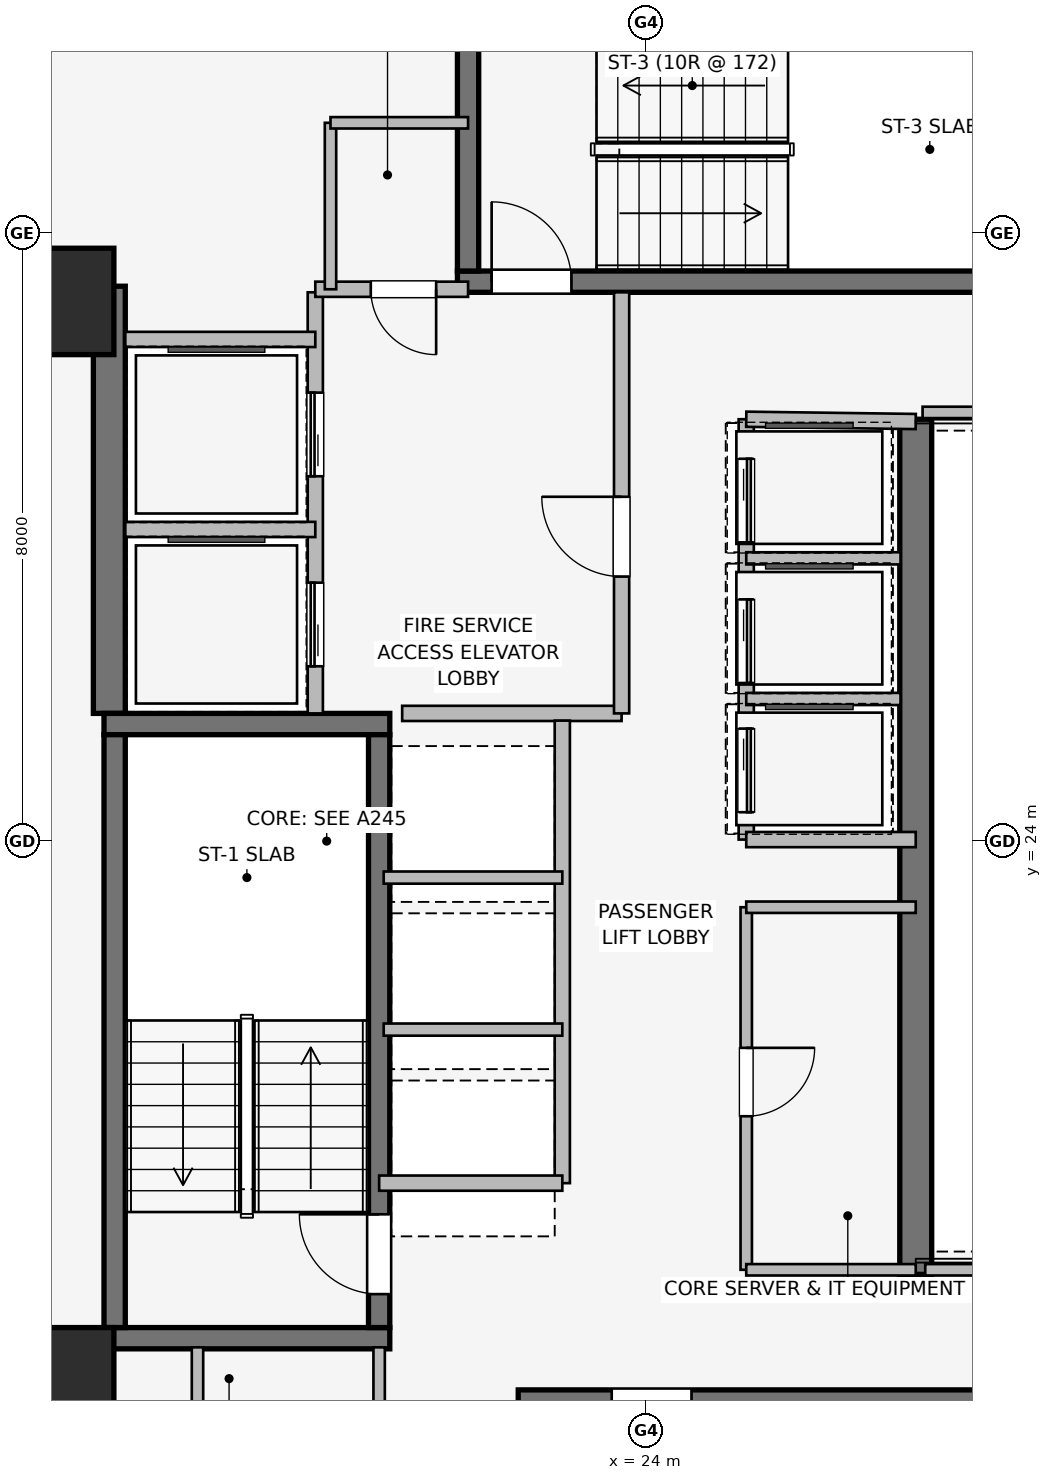
"""IFC4 building model, lengths in metres.
Left out: names, types, materials, properties, quantities, classifications, styles, units other than length and angle.
Written with IfcOpenShell. Run it as: python <this file> out.ifc"""

import sys

from ifc_helpers import new_model, si_unit, direction, frame, frame_2d, origin, origin_2d, place, context, subcontext, project, spatial, rectangle, extrude, element, fill, save


model = new_model("IFC4")
c1 = context("Model", 3, precision=1e-05, world=origin(), true_north=direction((0.0, 1.0)))
c2 = subcontext(c1, "Body", "Model", "MODEL_VIEW")
j1 = project(units=[si_unit("LENGTHUNIT", "METRE"), si_unit("PLANEANGLEUNIT", "RADIAN")], contexts=[c1])
p1 = place(None, origin())
s1 = spatial("IfcSite", under=j1, at=p1, CompositionType="ELEMENT")
p2 = place(p1, origin())
s2 = spatial("IfcBuilding", under=s1, at=p2, CompositionType="ELEMENT")
p3 = place(p2, frame((0.0, 0.0, 160.2)))
s3 = spatial("IfcBuildingStorey", under=s2, at=p3, CompositionType="ELEMENT", Elevation=160.2)
p4 = place(p3, frame((16.94, 25.68, 0.0), z_axis=(0.0, 0.0, 1.0), x_axis=(0.0, 1.0, 0.0)))
e1 = element("IfcWall", 1, at=p4, inside=s3, PredefinedType="SHEAR", context=c2, shape_type="SweptSolid", body=[
    extrude(rectangle(XDim=5.62, YDim=0.42, at=frame_2d((2.81, 0.0))), origin(), (0.0, 0.0, 1.0), 3.45),
])
p5 = place(p3, frame((27.55, 29.55, 0.0), z_axis=(0.0, 0.0, 1.0), x_axis=(0.0, -1.0, 0.0)))
e2 = element("IfcWall", 2, at=p5, inside=s3, PredefinedType="SHEAR", context=c2, shape_type="SweptSolid", body=[
    extrude(rectangle(XDim=11.25, YDim=0.42, at=frame_2d((5.625, 0.0))), origin(), (0.0, 0.0, 1.0), 3.45),
])
for number, where, z_axis, x_axis in (
    (3, (16.87, 17.46, 0.0), (0.0, 0.0, 1.0), (1.0, 0.0, 0.0)),
    (4, (20.63, 25.54, 0.0), (0.0, 0.0, 1.0), (-1.0, 0.0, 0.0)),
):
    element("IfcWall", number, at=place(p3, frame(where, z_axis=z_axis, x_axis=x_axis)), inside=s3, PredefinedType="SHEAR", context=c2, shape_type="SweptSolid", body=[
        extrude(rectangle(XDim=3.76, YDim=0.28, at=frame_2d((1.88, 0.0))), origin(), (0.0, 0.0, 1.0), 3.45),
    ])
p6 = place(p3, frame((17.01, 25.4, 0.0), z_axis=(0.0, 0.0, 1.0), x_axis=(0.0, -1.0, 0.0)))
e5 = element("IfcWall", 5, at=p6, inside=s3, PredefinedType="SHEAR", context=c2, shape_type="SweptSolid", body=[
    extrude(rectangle(XDim=7.8, YDim=0.28, at=frame_2d((3.9, 0.0))), origin(), (0.0, 0.0, 1.0), 3.45),
])
p7 = place(p3, frame((20.49, 17.6, 0.0), z_axis=(0.0, 0.0, 1.0), x_axis=(0.0, 1.0, 0.0)))
e6 = element("IfcWall", 6, at=p7, inside=s3, PredefinedType="SHEAR", context=c2, shape_type="SweptSolid", body=[
    extrude(rectangle(XDim=7.8, YDim=0.28, at=frame_2d((3.9, 0.0))), origin(), (0.0, 0.0, 1.0), 3.45),
])
p8 = place(p7, frame((0.44, 0.0, 0.0)))
e7 = element("IfcOpeningElement", 7, at=p8, cuts=e6, PredefinedType="OPENING", context=c2, shape_type="SweptSolid", body=[
    extrude(rectangle(XDim=1.05, YDim=2.0, at=frame_2d((0.525, 1.0))), frame((0.0, 0.15, 0.0), z_axis=(0.0, -1.0, 0.0), x_axis=(1.0, 0.0, 0.0)), (0.0, 0.0, 1.0), 0.3),
])
p9 = place(p3, frame((30.68, 16.64, 0.0), z_axis=(0.0, 0.0, 1.0), x_axis=(-1.0, 0.0, 0.0)))
e8 = element("IfcWall", 8, at=p9, inside=s3, PredefinedType="SHEAR", context=c2, shape_type="SweptSolid", body=[
    extrude(rectangle(XDim=8.36, YDim=0.28, at=frame_2d((4.18, 0.0))), origin(), (0.0, 0.0, 1.0), 3.45),
])
p10 = place(p9, frame((6.08, 0.0, 0.0)))
e9 = element("IfcOpeningElement", 9, at=p10, cuts=e8, PredefinedType="OPENING", context=c2, shape_type="SweptSolid", body=[
    extrude(rectangle(XDim=1.05, YDim=2.0, at=frame_2d((0.525, 1.0))), frame((0.0, 0.15, 0.0), z_axis=(0.0, -1.0, 0.0), x_axis=(1.0, 0.0, 0.0)), (0.0, 0.0, 1.0), 0.3),
])
p11 = place(p3, frame((21.52, 31.36, 0.0), z_axis=(0.0, 0.0, 1.0), x_axis=(1.0, 0.0, 0.0)))
e10 = element("IfcWall", 10, at=p11, inside=s3, PredefinedType="SHEAR", context=c2, shape_type="SweptSolid", body=[
    extrude(rectangle(XDim=8.36, YDim=0.28, at=frame_2d((4.18, 0.0))), origin(), (0.0, 0.0, 1.0), 3.45),
])
p12 = place(p11, frame((0.45, 0.0, 0.0)))
e11 = element("IfcOpeningElement", 11, at=p12, cuts=e10, PredefinedType="OPENING", context=c2, shape_type="SweptSolid", body=[
    extrude(rectangle(XDim=1.05, YDim=2.0, at=frame_2d((0.525, 1.0))), frame((0.0, 0.15, 0.0), z_axis=(0.0, -1.0, 0.0), x_axis=(1.0, 0.0, 0.0)), (0.0, 0.0, 1.0), 0.3),
])
p13 = place(p3, frame((21.66, 34.7, 0.0), z_axis=(0.0, 0.0, 1.0), x_axis=(0.0, -1.0, 0.0)))
e12 = element("IfcWall", 12, at=p13, inside=s3, PredefinedType="SHEAR", context=c2, shape_type="SweptSolid", body=[
    extrude(rectangle(XDim=3.2, YDim=0.28, at=frame_2d((1.6, 0.0))), origin(), (0.0, 0.0, 1.0), 3.45),
])
for number, where, z_axis, x_axis in (
    (13, (16.3, 16.9, 0.0), (0.0, 0.0, 1.0), (1.0, 0.0, 0.0)),
    (14, (16.3, 31.1, 0.0), (0.0, 0.0, 1.0), (1.0, 0.0, 0.0)),
):
    element("IfcColumn", number, at=place(p3, frame(where, z_axis=z_axis, x_axis=x_axis)), inside=s3, PredefinedType="COLUMN", context=c2, shape_type="SweptSolid", body=[
        extrude(rectangle(XDim=1.4, YDim=1.4, at=origin_2d()), origin(), (0.0, 0.0, 1.0), 3.45),
    ])
p14 = place(p3, frame((19.65, 25.68, 0.0), z_axis=(0.0, 0.0, 1.0), x_axis=(0.0, 1.0, 0.0)))
e15 = element("IfcWall", 15, at=p14, inside=s3, PredefinedType="PARTITIONING", context=c2, shape_type="SweptSolid", body=[
    extrude(rectangle(XDim=5.54, YDim=0.2, at=frame_2d((2.77, 0.0))), origin(), (0.0, 0.0, 1.0), 3.03),
])
p15 = place(p14, frame((0.62, 0.0, 0.0)))
e16 = element("IfcOpeningElement", 16, at=p15, cuts=e15, PredefinedType="OPENING", context=c2, shape_type="SweptSolid", body=[
    extrude(rectangle(XDim=1.1, YDim=2.2, at=frame_2d((0.55, 1.1))), frame((0.0, 0.11, 0.0), z_axis=(0.0, -1.0, 0.0), x_axis=(1.0, 0.0, 0.0)), (0.0, 0.0, 1.0), 0.22),
])
p16 = place(p14, frame((3.12, 0.0, 0.0)))
e17 = element("IfcOpeningElement", 17, at=p16, cuts=e15, PredefinedType="OPENING", context=c2, shape_type="SweptSolid", body=[
    extrude(rectangle(XDim=1.1, YDim=2.2, at=frame_2d((0.55, 1.1))), frame((0.0, 0.11, 0.0), z_axis=(0.0, -1.0, 0.0), x_axis=(1.0, 0.0, 0.0)), (0.0, 0.0, 1.0), 0.22),
])
p17 = place(p3, frame((20.793, 25.68, 0.0), z_axis=(0.0, 0.0, 1.0), x_axis=(1.0, 0.0, 0.0)))
e18 = element("IfcWall", 18, at=p17, inside=s3, PredefinedType="PARTITIONING", context=c2, shape_type="SweptSolid", body=[
    extrude(rectangle(XDim=2.887, YDim=0.2, at=frame_2d((1.443, 0.0))), origin(), (0.0, 0.0, 1.0), 3.03),
])
p18 = place(p3, frame((23.68, 25.68, 0.0), z_axis=(0.0, 0.0, 1.0), x_axis=(0.0, 1.0, 0.0)))
e19 = element("IfcWall", 19, at=p18, inside=s3, PredefinedType="PARTITIONING", context=c2, shape_type="SweptSolid", body=[
    extrude(rectangle(XDim=5.54, YDim=0.2, at=frame_2d((2.77, 0.0))), origin(), (0.0, 0.0, 1.0), 3.03),
])
p19 = place(p18, frame((1.8, 0.0, 0.0)))
e20 = element("IfcOpeningElement", 20, at=p19, cuts=e19, PredefinedType="OPENING", context=c2, shape_type="SweptSolid", body=[
    extrude(rectangle(XDim=1.05, YDim=2.0, at=frame_2d((0.525, 1.0))), frame((0.0, 0.11, 0.0), z_axis=(0.0, -1.0, 0.0), x_axis=(1.0, 0.0, 0.0)), (0.0, 0.0, 1.0), 0.22),
])
p20 = place(p3, frame((21.66, 31.26, 0.0), z_axis=(0.0, 0.0, 1.0), x_axis=(-1.0, 0.0, 0.0)))
e21 = element("IfcWall", 21, at=p20, inside=s3, PredefinedType="PARTITIONING", context=c2, shape_type="SweptSolid", body=[
    extrude(rectangle(XDim=2.01, YDim=0.2, at=frame_2d((1.005, 0.0))), origin(), (0.0, 0.0, 1.0), 3.03),
])
p21 = place(p20, frame((0.42, 0.0, 0.0)))
e22 = element("IfcOpeningElement", 22, at=p21, cuts=e21, PredefinedType="OPENING", context=c2, shape_type="SweptSolid", body=[
    extrude(rectangle(XDim=0.86, YDim=2.0, at=frame_2d((0.43, 1.0))), frame((0.0, 0.11, 0.0), z_axis=(0.0, -1.0, 0.0), x_axis=(1.0, 0.0, 0.0)), (0.0, 0.0, 1.0), 0.22),
])
p22 = place(p3, frame((17.15, 28.1, 0.0), z_axis=(0.0, 0.0, 1.0), x_axis=(1.0, 0.0, 0.0)))
e23 = element("IfcWall", 23, at=p22, inside=s3, PredefinedType="PARTITIONING", context=c2, shape_type="SweptSolid", body=[
    extrude(rectangle(XDim=2.5, YDim=0.2, at=frame_2d((1.25, 0.0))), origin(), (0.0, 0.0, 1.0), 3.03),
])
p23 = place(p3, frame((19.65, 30.6, 0.0), z_axis=(0.0, 0.0, 1.0), x_axis=(-1.0, 0.0, 0.0)))
e24 = element("IfcWall", 24, at=p23, inside=s3, PredefinedType="PARTITIONING", context=c2, shape_type="SweptSolid", body=[
    extrude(rectangle(XDim=2.5, YDim=0.2, at=frame_2d((1.25, 0.0))), origin(), (0.0, 0.0, 1.0), 1.93),
])
p24 = place(p3, frame((22.9, 19.5, 0.0), z_axis=(0.0, 0.0, 1.0), x_axis=(0.0, 1.0, 0.0)))
e25 = element("IfcWall", 25, at=p24, inside=s3, PredefinedType="PARTITIONING", context=c2, shape_type="SweptSolid", body=[
    extrude(rectangle(XDim=6.085, YDim=0.2, at=frame_2d((3.042, 0.0))), origin(), (0.0, 0.0, 1.0), 3.03),
])
p25 = place(p3, frame((20.49, 19.5, 0.0), z_axis=(0.0, 0.0, 1.0), x_axis=(1.0, 0.0, 0.0)))
e26 = element("IfcWall", 26, at=p25, inside=s3, PredefinedType="PARTITIONING", context=c2, shape_type="SweptSolid", body=[
    extrude(rectangle(XDim=2.41, YDim=0.2, at=frame_2d((1.205, 0.0))), origin(), (0.0, 0.0, 1.0), 1.93),
])
for number, where, z_axis, x_axis in (
    (27, (20.55, 21.52, 0.0), (0.0, 0.0, 1.0), (1.0, 0.0, 0.0)),
    (28, (20.55, 23.52, 0.0), (0.0, 0.0, 1.0), (1.0, 0.0, 0.0)),
):
    element("IfcWall", number, at=place(p3, frame(where, z_axis=z_axis, x_axis=x_axis)), inside=s3, PredefinedType="PARTITIONING", context=c2, shape_type="SweptSolid", body=[
        extrude(rectangle(XDim=2.35, YDim=0.16, at=frame_2d((1.175, 0.0))), origin(), (0.0, 0.0, 1.0), 3.03),
    ])
p26 = place(p3, frame((25.32, 29.55, 0.0), z_axis=(0.0, 0.0, 1.0), x_axis=(0.0, -1.0, 0.0)))
e29 = element("IfcWall", 29, at=p26, inside=s3, PredefinedType="PARTITIONING", context=c2, shape_type="SweptSolid", body=[
    extrude(rectangle(XDim=5.53, YDim=0.2, at=frame_2d((2.765, 0.0))), origin(), (0.0, 0.0, 1.0), 3.03),
])
p27 = place(p26, frame((0.52, 0.0, 0.0)))
e30 = element("IfcOpeningElement", 30, at=p27, cuts=e29, PredefinedType="OPENING", context=c2, shape_type="SweptSolid", body=[
    extrude(rectangle(XDim=1.1, YDim=2.2, at=frame_2d((0.55, 1.1))), frame((0.0, 0.11, 0.0), z_axis=(0.0, -1.0, 0.0), x_axis=(1.0, 0.0, 0.0)), (0.0, 0.0, 1.0), 0.22),
])
p28 = place(p26, frame((2.37, 0.0, 0.0)))
e31 = element("IfcOpeningElement", 31, at=p28, cuts=e29, PredefinedType="OPENING", context=c2, shape_type="SweptSolid", body=[
    extrude(rectangle(XDim=1.1, YDim=2.2, at=frame_2d((0.55, 1.1))), frame((0.0, 0.11, 0.0), z_axis=(0.0, -1.0, 0.0), x_axis=(1.0, 0.0, 0.0)), (0.0, 0.0, 1.0), 0.22),
])
p29 = place(p26, frame((4.07, 0.0, 0.0)))
e32 = element("IfcOpeningElement", 32, at=p29, cuts=e29, PredefinedType="OPENING", context=c2, shape_type="SweptSolid", body=[
    extrude(rectangle(XDim=1.1, YDim=2.2, at=frame_2d((0.55, 1.1))), frame((0.0, 0.11, 0.0), z_axis=(0.0, -1.0, 0.0), x_axis=(1.0, 0.0, 0.0)), (0.0, 0.0, 1.0), 0.22),
])
p30 = place(p3, frame((27.55, 29.52, 0.0), z_axis=(0.0, 0.0, 1.0), x_axis=(-0.999909343457, 0.013464949556, 0.0)))
e33 = element("IfcWall", 33, at=p30, inside=s3, PredefinedType="PARTITIONING", context=c2, shape_type="SweptSolid", body=[
    extrude(rectangle(XDim=2.23, YDim=0.2, at=frame_2d((1.115, 0.0))), origin(), (0.0, 0.0, 1.0), 1.93),
])
p31 = place(p3, frame((25.32, 24.02, 0.0), z_axis=(0.0, 0.0, 1.0), x_axis=(1.0, 0.0, 0.0)))
e34 = element("IfcWall", 34, at=p31, inside=s3, PredefinedType="PARTITIONING", context=c2, shape_type="SweptSolid", body=[
    extrude(rectangle(XDim=2.23, YDim=0.2, at=frame_2d((1.115, 0.0))), origin(), (0.0, 0.0, 1.0), 3.03),
])
for number, where, z_axis, x_axis in (
    (35, (25.32, 25.87, 0.0), (0.0, 0.0, 1.0), (1.0, 0.0, 0.0)),
    (36, (25.32, 27.72, 0.0), (0.0, 0.0, 1.0), (1.0, 0.0, 0.0)),
):
    element("IfcWall", number, at=place(p3, frame(where, z_axis=z_axis, x_axis=x_axis)), inside=s3, PredefinedType="PARTITIONING", context=c2, shape_type="SweptSolid", body=[
        extrude(rectangle(XDim=2.03, YDim=0.16, at=frame_2d((1.015, 0.0))), origin(), (0.0, 0.0, 1.0), 3.03),
    ])
p32 = place(p3, frame((25.32, 23.13, 0.0), z_axis=(0.0, 0.0, 1.0), x_axis=(0.0, -1.0, 0.0)))
e37 = element("IfcWall", 37, at=p32, inside=s3, PredefinedType="PARTITIONING", context=c2, shape_type="SweptSolid", body=[
    extrude(rectangle(XDim=4.77, YDim=0.15, at=frame_2d((2.385, 0.0))), origin(), (0.0, 0.0, 1.0), 3.03),
])
p33 = place(p32, frame((1.85, 0.0, 0.0)))
e38 = element("IfcOpeningElement", 38, at=p33, cuts=e37, PredefinedType="OPENING", context=c2, shape_type="SweptSolid", body=[
    extrude(rectangle(XDim=0.9, YDim=2.0, at=frame_2d((0.45, 1.0))), frame((0.0, 0.085, 0.0), z_axis=(0.0, -1.0, 0.0), x_axis=(1.0, 0.0, 0.0)), (0.0, 0.0, 1.0), 0.17),
])
for number, where, z_axis, x_axis in (
    (39, (25.32, 23.13, 0.0), (0.0, 0.0, 1.0), (1.0, 0.0, 0.0)),
    (40, (25.32, 18.36, 0.0), (0.0, 0.0, 1.0), (1.0, 0.0, 0.0)),
):
    element("IfcWall", number, at=place(p3, frame(where, z_axis=z_axis, x_axis=x_axis)), inside=s3, PredefinedType="PARTITIONING", context=c2, shape_type="SweptSolid", body=[
        extrude(rectangle(XDim=2.23, YDim=0.15, at=frame_2d((1.115, 0.0))), origin(), (0.0, 0.0, 1.0), 3.03),
    ])
p34 = place(p3, frame((18.1, 17.34, 0.0), z_axis=(0.0, 0.0, 1.0), x_axis=(0.0, -1.0, 0.0)))
e41 = element("IfcWall", 41, at=p34, inside=s3, PredefinedType="PARTITIONING", context=c2, shape_type="SweptSolid", body=[
    extrude(rectangle(XDim=2.52, YDim=0.15, at=frame_2d((1.26, 0.0))), origin(), (0.0, 0.0, 1.0), 3.03),
])
p35 = place(p3, frame((20.49, 14.82, 0.0), z_axis=(0.0, 0.0, 1.0), x_axis=(0.0, 1.0, 0.0)))
e42 = element("IfcWall", 42, at=p35, inside=s3, PredefinedType="PARTITIONING", context=c2, shape_type="SweptSolid", body=[
    extrude(rectangle(XDim=2.52, YDim=0.15, at=frame_2d((1.26, 0.0))), origin(), (0.0, 0.0, 1.0), 3.03),
])
p36 = place(p35, frame((0.72, 0.0, 0.0)))
e43 = element("IfcOpeningElement", 43, at=p36, cuts=e42, PredefinedType="OPENING", context=c2, shape_type="SweptSolid", body=[
    extrude(rectangle(XDim=0.86, YDim=2.0, at=frame_2d((0.43, 1.0))), frame((0.0, 0.085, 0.0), z_axis=(0.0, -1.0, 0.0), x_axis=(1.0, 0.0, 0.0)), (0.0, 0.0, 1.0), 0.17),
])
p37 = place(p3, frame((19.85, 33.45, 0.0), z_axis=(0.0, 0.0, 1.0), x_axis=(0.0, -1.0, 0.0)))
e44 = element("IfcWall", 44, at=p37, inside=s3, PredefinedType="PARTITIONING", context=c2, shape_type="SweptSolid", body=[
    extrude(rectangle(XDim=2.19, YDim=0.15, at=frame_2d((1.095, 0.0))), origin(), (0.0, 0.0, 1.0), 3.03),
])
p38 = place(p3, frame((21.66, 33.45, 0.0), z_axis=(0.0, 0.0, 1.0), x_axis=(-1.0, 0.0, 0.0)))
e45 = element("IfcWall", 45, at=p38, inside=s3, PredefinedType="PARTITIONING", context=c2, shape_type="SweptSolid", body=[
    extrude(rectangle(XDim=1.81, YDim=0.15, at=frame_2d((0.905, 0.0))), origin(), (0.0, 0.0, 1.0), 3.03),
])
p39 = place(p3, frame((27.675, 18.36, 0.0), z_axis=(0.0, 0.0, 1.0), x_axis=(1.0, 0.0, 0.0)))
e46 = element("IfcWall", 46, at=p39, inside=s3, PredefinedType="PARTITIONING", context=c2, shape_type="SweptSolid", body=[
    extrude(rectangle(XDim=12.165, YDim=0.15, at=frame_2d((6.083, 0.0))), origin(), (0.0, 0.0, 1.0), 2.022),
])
p40 = place(p3, frame((39.84, 29.64, 0.0), z_axis=(0.0, 0.0, 1.0), x_axis=(-1.0, 0.0, 0.0)))
e47 = element("IfcWall", 47, at=p40, inside=s3, PredefinedType="PARTITIONING", context=c2, shape_type="SweptSolid", body=[
    extrude(rectangle(XDim=12.2, YDim=0.15, at=frame_2d((6.1, 0.0))), origin(), (0.0, 0.0, 1.0), 2.022),
])
p41 = place(p8, origin())
e48 = element("IfcDoor", 48, at=p41, inside=s3, OperationType="SINGLE_SWING_RIGHT", PredefinedType="DOOR", context=c2, shape_type="SweptSolid", body=[
    extrude(rectangle(XDim=1.05, YDim=2.0, at=frame_2d((0.525, 1.0))), frame((0.0, 0.025, 0.0), z_axis=(0.0, -1.0, 0.0), x_axis=(1.0, 0.0, 0.0)), (0.0, 0.0, 1.0), 0.05),
])
fill(e7, e48)
p42 = place(p10, origin())
e49 = element("IfcDoor", 49, at=p42, inside=s3, OperationType="SINGLE_SWING_RIGHT", PredefinedType="DOOR", context=c2, shape_type="SweptSolid", body=[
    extrude(rectangle(XDim=1.05, YDim=2.0, at=frame_2d((0.525, 1.0))), frame((0.0, 0.025, 0.0), z_axis=(0.0, -1.0, 0.0), x_axis=(1.0, 0.0, 0.0)), (0.0, 0.0, 1.0), 0.05),
])
fill(e9, e49)
p43 = place(p12, origin())
e50 = element("IfcDoor", 50, at=p43, inside=s3, OperationType="SINGLE_SWING_LEFT", PredefinedType="DOOR", context=c2, shape_type="SweptSolid", body=[
    extrude(rectangle(XDim=1.05, YDim=2.0, at=frame_2d((0.525, 1.0))), frame((0.0, 0.025, 0.0), z_axis=(0.0, -1.0, 0.0), x_axis=(1.0, 0.0, 0.0)), (0.0, 0.0, 1.0), 0.05),
])
fill(e11, e50)
p44 = place(p15, origin())
e51 = element("IfcDoor", 51, at=p44, inside=s3, OperationType="SLIDING_TO_LEFT", PredefinedType="DOOR", context=c2, shape_type="SweptSolid", body=[
    extrude(rectangle(XDim=1.1, YDim=2.2, at=frame_2d((0.55, 1.1))), frame((0.0, 0.025, 0.0), z_axis=(0.0, -1.0, 0.0), x_axis=(1.0, 0.0, 0.0)), (0.0, 0.0, 1.0), 0.05),
])
fill(e16, e51)
p45 = place(p16, origin())
e52 = element("IfcDoor", 52, at=p45, inside=s3, OperationType="SLIDING_TO_LEFT", PredefinedType="DOOR", context=c2, shape_type="SweptSolid", body=[
    extrude(rectangle(XDim=1.1, YDim=2.2, at=frame_2d((0.55, 1.1))), frame((0.0, 0.025, 0.0), z_axis=(0.0, -1.0, 0.0), x_axis=(1.0, 0.0, 0.0)), (0.0, 0.0, 1.0), 0.05),
])
fill(e17, e52)
p46 = place(p19, origin())
e53 = element("IfcDoor", 53, at=p46, inside=s3, OperationType="SINGLE_SWING_RIGHT", PredefinedType="DOOR", context=c2, shape_type="SweptSolid", body=[
    extrude(rectangle(XDim=1.05, YDim=2.0, at=frame_2d((0.525, 1.0))), frame((0.0, 0.025, 0.0), z_axis=(0.0, -1.0, 0.0), x_axis=(1.0, 0.0, 0.0)), (0.0, 0.0, 1.0), 0.05),
])
fill(e20, e53)
p47 = place(p21, origin())
e54 = element("IfcDoor", 54, at=p47, inside=s3, OperationType="SINGLE_SWING_LEFT", PredefinedType="DOOR", context=c2, shape_type="SweptSolid", body=[
    extrude(rectangle(XDim=0.86, YDim=2.0, at=frame_2d((0.43, 1.0))), frame((0.0, 0.025, 0.0), z_axis=(0.0, -1.0, 0.0), x_axis=(1.0, 0.0, 0.0)), (0.0, 0.0, 1.0), 0.05),
])
fill(e22, e54)
p48 = place(p27, origin())
e55 = element("IfcDoor", 55, at=p48, inside=s3, OperationType="SLIDING_TO_LEFT", PredefinedType="DOOR", context=c2, shape_type="SweptSolid", body=[
    extrude(rectangle(XDim=1.1, YDim=2.2, at=frame_2d((0.55, 1.1))), frame((0.0, 0.025, 0.0), z_axis=(0.0, -1.0, 0.0), x_axis=(1.0, 0.0, 0.0)), (0.0, 0.0, 1.0), 0.05),
])
fill(e30, e55)
p49 = place(p28, origin())
e56 = element("IfcDoor", 56, at=p49, inside=s3, OperationType="SLIDING_TO_LEFT", PredefinedType="DOOR", context=c2, shape_type="SweptSolid", body=[
    extrude(rectangle(XDim=1.1, YDim=2.2, at=frame_2d((0.55, 1.1))), frame((0.0, 0.025, 0.0), z_axis=(0.0, -1.0, 0.0), x_axis=(1.0, 0.0, 0.0)), (0.0, 0.0, 1.0), 0.05),
])
fill(e31, e56)
p50 = place(p29, origin())
e57 = element("IfcDoor", 57, at=p50, inside=s3, OperationType="SLIDING_TO_LEFT", PredefinedType="DOOR", context=c2, shape_type="SweptSolid", body=[
    extrude(rectangle(XDim=1.1, YDim=2.2, at=frame_2d((0.55, 1.1))), frame((0.0, 0.025, 0.0), z_axis=(0.0, -1.0, 0.0), x_axis=(1.0, 0.0, 0.0)), (0.0, 0.0, 1.0), 0.05),
])
fill(e32, e57)
p51 = place(p33, origin())
e58 = element("IfcDoor", 58, at=p51, inside=s3, OperationType="SINGLE_SWING_LEFT", PredefinedType="DOOR", context=c2, shape_type="SweptSolid", body=[
    extrude(rectangle(XDim=0.9, YDim=2.0, at=frame_2d((0.45, 1.0))), frame((0.0, 0.025, 0.0), z_axis=(0.0, -1.0, 0.0), x_axis=(1.0, 0.0, 0.0)), (0.0, 0.0, 1.0), 0.05),
])
fill(e38, e58)
save(model, sys.argv[1])
